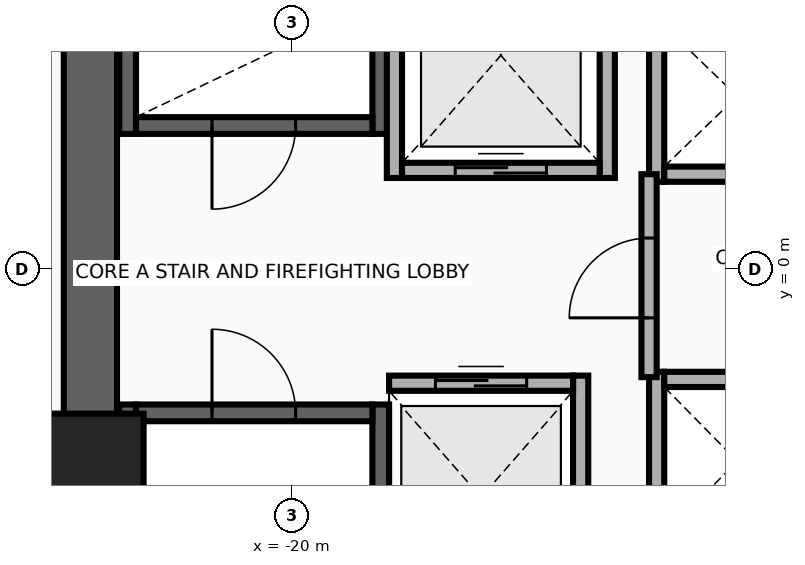
"""IFC4 building model, lengths in metres.
Left out: names, types, materials, properties, quantities, classifications, styles, units other than length and angle.
Written with IfcOpenShell. Run it as: python <this file> out.ifc"""

import sys

from ifc_helpers import new_model, si_unit, direction, frame, frame_2d, origin, origin_2d, place, context, subcontext, project, spatial, rectangle, extrude, source, transform, mapped, element, fill, save


model = new_model("IFC4")
c1 = context("Model", 3, precision=1e-05, world=origin(), true_north=direction((0.0, 1.0)))
c2 = subcontext(c1, "Body", "Model", "MODEL_VIEW")
j1 = project(units=[si_unit("LENGTHUNIT", "METRE"), si_unit("PLANEANGLEUNIT", "RADIAN")], contexts=[c1])
p1 = place(None, origin())
s1 = spatial("IfcSite", under=j1, at=p1, CompositionType="ELEMENT")
p2 = place(p1, origin())
s2 = spatial("IfcBuilding", under=s1, at=p2, CompositionType="ELEMENT")
p3 = place(p2, frame((0.0, 0.0, 37.1)))
s3 = spatial("IfcBuildingStorey", under=s2, at=p3, CompositionType="ELEMENT", Elevation=37.1)
for number, where, z_axis, x_axis in (
    (1, (-22.16, 1.78, 0.0), (0.0, 0.0, 1.0), (0.0, 1.0, 0.0)),
    (2, (-18.83, 1.78, 0.0), (0.0, 0.0, 1.0), (0.0, 1.0, 0.0)),
):
    element("IfcWall", number, at=place(p3, frame(where, z_axis=z_axis, x_axis=x_axis)), inside=s3, PredefinedType="SHEAR", context=c2, shape_type="SweptSolid", body=[
        extrude(rectangle(XDim=8.67, YDim=0.22, at=frame_2d((4.335, 0.0))), origin(), (0.0, 0.0, 1.0), 3.46),
    ])
p4 = place(p3, frame((-22.05, 1.89, 0.0), z_axis=(0.0, 0.0, 1.0), x_axis=(1.0, 0.0, 0.0)))
e3 = element("IfcWall", 3, at=p4, inside=s3, PredefinedType="SHEAR", context=c2, shape_type="SweptSolid", body=[
    extrude(rectangle(XDim=3.11, YDim=0.22, at=frame_2d((1.555, 0.0))), origin(), (0.0, 0.0, 1.0), 3.46),
])
p5 = place(p4, frame((1.0, 0.0, 0.0)))
e4 = element("IfcOpeningElement", 4, at=p5, cuts=e3, PredefinedType="OPENING", context=c2, shape_type="SweptSolid", body=[
    extrude(rectangle(XDim=1.1, YDim=2.15, at=frame_2d((0.55, 1.075))), frame((0.0, 0.125, 0.0), z_axis=(0.0, -1.0, 0.0), x_axis=(1.0, 0.0, 0.0)), (0.0, 0.0, 1.0), 0.25),
])
for number, where, z_axis, x_axis in (
    (5, (-22.16, -10.45, 0.0), (0.0, 0.0, 1.0), (0.0, 1.0, 0.0)),
    (6, (-18.83, -10.45, 0.0), (0.0, 0.0, 1.0), (0.0, 1.0, 0.0)),
):
    element("IfcWall", number, at=place(p3, frame(where, z_axis=z_axis, x_axis=x_axis)), inside=s3, PredefinedType="SHEAR", context=c2, shape_type="SweptSolid", body=[
        extrude(rectangle(XDim=8.67, YDim=0.22, at=frame_2d((4.335, 0.0))), origin(), (0.0, 0.0, 1.0), 3.46),
    ])
p6 = place(p3, frame((-22.05, -1.89, 0.0), z_axis=(0.0, 0.0, 1.0), x_axis=(1.0, 0.0, 0.0)))
e7 = element("IfcWall", 7, at=p6, inside=s3, PredefinedType="SHEAR", context=c2, shape_type="SweptSolid", body=[
    extrude(rectangle(XDim=3.11, YDim=0.22, at=frame_2d((1.555, 0.0))), origin(), (0.0, 0.0, 1.0), 3.46),
])
p7 = place(p6, frame((1.0, 0.0, 0.0)))
e8 = element("IfcOpeningElement", 8, at=p7, cuts=e7, PredefinedType="OPENING", context=c2, shape_type="SweptSolid", body=[
    extrude(rectangle(XDim=1.1, YDim=2.15, at=frame_2d((0.55, 1.075))), frame((0.0, 0.125, 0.0), z_axis=(0.0, -1.0, 0.0), x_axis=(1.0, 0.0, 0.0)), (0.0, 0.0, 1.0), 0.25),
])
p8 = place(p3, frame((-22.65, -11.15, 0.0), z_axis=(0.0, 0.0, 1.0), x_axis=(0.0, 1.0, 0.0)))
e9 = element("IfcWall", 9, at=p8, inside=s3, PredefinedType="SHEAR", context=c2, shape_type="SweptSolid", body=[
    extrude(rectangle(XDim=22.3, YDim=0.7, at=frame_2d((11.15, 0.0))), origin(), (0.0, 0.0, 1.0), 3.46),
])
m1 = source(origin(), c2, "Body", "SweptSolid", [
    extrude(rectangle(XDim=1.4, YDim=1.4, at=origin_2d()), origin(), (0.0, 0.0, 1.0), 3.7),
])
p9 = place(p3, frame((-22.65, -2.6, 0.0), z_axis=(0.0, 0.0, 1.0), x_axis=(1.0, 0.0, 0.0)))
e10 = element("IfcColumn", 10, at=p9, inside=s3, PredefinedType="COLUMN", context=c2, shape_type="MappedRepresentation", body=[
    mapped(m1, transform((0.0, 0.0, 0.0), x_axis=(1.0, 0.0, 0.0), y_axis=(0.0, 1.0, 0.0), z_axis=(0.0, 0.0, 1.0), scale=1.0)),
])
for number, where, z_axis, x_axis in (
    (11, (-18.65, 1.2, 0.0), (0.0, 0.0, 1.0), (0.0, 1.0, 0.0)),
    (12, (-15.85, 1.2, 0.0), (0.0, 0.0, 1.0), (0.0, 1.0, 0.0)),
):
    element("IfcWall", number, at=place(p3, frame(where, z_axis=z_axis, x_axis=x_axis)), inside=s3, PredefinedType="MOVABLE", context=c2, shape_type="SweptSolid", body=[
        extrude(rectangle(XDim=3.225, YDim=0.2, at=frame_2d((1.613, 0.0))), origin(), (0.0, 0.0, 1.0), 3.46),
    ])
p10 = place(p3, frame((-18.55, 1.3, 0.0), z_axis=(0.0, 0.0, 1.0), x_axis=(1.0, 0.0, 0.0)))
e13 = element("IfcWall", 13, at=p10, inside=s3, PredefinedType="MOVABLE", context=c2, shape_type="SweptSolid", body=[
    extrude(rectangle(XDim=2.6, YDim=0.2, at=frame_2d((1.3, 0.0))), origin(), (0.0, 0.0, 1.0), 3.46),
])
p11 = place(p10, frame((0.7, 0.0, 0.0)))
e14 = element("IfcOpeningElement", 14, at=p11, cuts=e13, PredefinedType="OPENING", context=c2, shape_type="SweptSolid", body=[
    extrude(rectangle(XDim=1.2, YDim=2.1, at=frame_2d((0.6, 1.05))), frame((0.0, 0.115, 0.0), z_axis=(0.0, -1.0, 0.0), x_axis=(1.0, 0.0, 0.0)), (0.0, 0.0, 1.0), 0.23),
])
p12 = place(p3, frame((-16.2, -4.6, 0.0), z_axis=(0.0, 0.0, 1.0), x_axis=(0.0, 1.0, 0.0)))
e15 = element("IfcWall", 15, at=p12, inside=s3, PredefinedType="MOVABLE", context=c2, shape_type="SweptSolid", body=[
    extrude(rectangle(XDim=3.2, YDim=0.2, at=frame_2d((1.6, 0.0))), origin(), (0.0, 0.0, 1.0), 3.46),
])
p13 = place(p3, frame((-18.72, -1.5, 0.0), z_axis=(0.0, 0.0, 1.0), x_axis=(1.0, 0.0, 0.0)))
e16 = element("IfcWall", 16, at=p13, inside=s3, PredefinedType="MOVABLE", context=c2, shape_type="SweptSolid", body=[
    extrude(rectangle(XDim=2.42, YDim=0.2, at=frame_2d((1.21, 0.0))), origin(), (0.0, 0.0, 1.0), 3.46),
])
p14 = place(p13, frame((0.61, 0.0, 0.0)))
e17 = element("IfcOpeningElement", 17, at=p14, cuts=e16, PredefinedType="OPENING", context=c2, shape_type="SweptSolid", body=[
    extrude(rectangle(XDim=1.2, YDim=2.1, at=frame_2d((0.6, 1.05))), frame((0.0, 0.115, 0.0), z_axis=(0.0, -1.0, 0.0), x_axis=(1.0, 0.0, 0.0)), (0.0, 0.0, 1.0), 0.23),
])
p15 = place(p3, frame((-15.2, 1.15, 0.0), z_axis=(0.0, 0.0, 1.0), x_axis=(0.0, 1.0, 0.0)))
e18 = element("IfcWall", 18, at=p15, inside=s3, PredefinedType="MOVABLE", context=c2, shape_type="SweptSolid", body=[
    extrude(rectangle(XDim=2.25, YDim=0.2, at=frame_2d((1.125, 0.0))), origin(), (0.0, 0.0, 1.0), 3.46),
])
p16 = place(p3, frame((-15.1, 1.25, 0.0), z_axis=(0.0, 0.0, 1.0), x_axis=(1.0, 0.0, 0.0)))
e19 = element("IfcWall", 19, at=p16, inside=s3, PredefinedType="MOVABLE", context=c2, shape_type="SweptSolid", body=[
    extrude(rectangle(XDim=1.92, YDim=0.2, at=frame_2d((0.96, 0.0))), origin(), (0.0, 0.0, 1.0), 3.46),
])
p17 = place(p3, frame((-15.2, -3.7, 0.0), z_axis=(0.0, 0.0, 1.0), x_axis=(0.0, 1.0, 0.0)))
e20 = element("IfcWall", 20, at=p17, inside=s3, PredefinedType="MOVABLE", context=c2, shape_type="SweptSolid", body=[
    extrude(rectangle(XDim=2.35, YDim=0.2, at=frame_2d((1.175, 0.0))), origin(), (0.0, 0.0, 1.0), 3.46),
])
p18 = place(p3, frame((-15.1, -1.45, 0.0), z_axis=(0.0, 0.0, 1.0), x_axis=(1.0, 0.0, 0.0)))
e21 = element("IfcWall", 21, at=p18, inside=s3, PredefinedType="MOVABLE", context=c2, shape_type="SweptSolid", body=[
    extrude(rectangle(XDim=1.92, YDim=0.2, at=frame_2d((0.96, 0.0))), origin(), (0.0, 0.0, 1.0), 3.46),
])
p19 = place(p3, frame((-15.3, -1.42, 0.0), z_axis=(0.0, 0.0, 1.0), x_axis=(0.0, 1.0, 0.0)))
e22 = element("IfcWall", 22, at=p19, inside=s3, PredefinedType="PARTITIONING", context=c2, shape_type="SweptSolid", body=[
    extrude(rectangle(XDim=2.67, YDim=0.2, at=frame_2d((1.335, 0.0))), origin(), (0.0, 0.0, 1.0), 3.46),
])
p20 = place(p19, frame((0.78, 0.0, 0.0)))
e23 = element("IfcOpeningElement", 23, at=p20, cuts=e22, PredefinedType="OPENING", context=c2, shape_type="SweptSolid", body=[
    extrude(rectangle(XDim=1.05, YDim=2.15, at=frame_2d((0.525, 1.075))), frame((0.0, 0.115, 0.0), z_axis=(0.0, -1.0, 0.0), x_axis=(1.0, 0.0, 0.0)), (0.0, 0.0, 1.0), 0.23),
])
p21 = place(p11, origin())
e24 = element("IfcDoor", 24, at=p21, inside=s3, OperationType="DOUBLE_DOOR_SLIDING", PredefinedType="DOOR", context=c2, shape_type="SweptSolid", body=[
    extrude(rectangle(XDim=1.2, YDim=2.1, at=frame_2d((0.6, 1.05))), frame((0.0, 0.025, 0.0), z_axis=(0.0, -1.0, 0.0), x_axis=(1.0, 0.0, 0.0)), (0.0, 0.0, 1.0), 0.05),
])
fill(e14, e24)
p22 = place(p14, origin())
e25 = element("IfcDoor", 25, at=p22, inside=s3, OperationType="DOUBLE_DOOR_SLIDING", PredefinedType="DOOR", context=c2, shape_type="SweptSolid", body=[
    extrude(rectangle(XDim=1.2, YDim=2.1, at=frame_2d((0.6, 1.05))), frame((0.0, 0.025, 0.0), z_axis=(0.0, -1.0, 0.0), x_axis=(1.0, 0.0, 0.0)), (0.0, 0.0, 1.0), 0.05),
])
fill(e17, e25)
p23 = place(p20, origin())
e26 = element("IfcDoor", 26, at=p23, inside=s3, OperationType="SINGLE_SWING_RIGHT", PredefinedType="DOOR", context=c2, shape_type="SweptSolid", body=[
    extrude(rectangle(XDim=1.05, YDim=2.15, at=frame_2d((0.525, 1.075))), frame((0.0, 0.025, 0.0), z_axis=(0.0, -1.0, 0.0), x_axis=(1.0, 0.0, 0.0)), (0.0, 0.0, 1.0), 0.05),
])
fill(e23, e26)
p24 = place(p5, frame((1.1, 0.0, 0.0), z_axis=(0.0, 0.0, 1.0), x_axis=(-1.0, 0.0, 0.0)))
e27 = element("IfcDoor", 27, at=p24, inside=s3, OperationType="SINGLE_SWING_LEFT", PredefinedType="DOOR", context=c2, shape_type="SweptSolid", body=[
    extrude(rectangle(XDim=1.1, YDim=2.15, at=frame_2d((0.55, 1.075))), frame((0.0, 0.025, 0.0), z_axis=(0.0, -1.0, 0.0), x_axis=(1.0, 0.0, 0.0)), (0.0, 0.0, 1.0), 0.05),
])
fill(e4, e27)
p25 = place(p7, origin())
e28 = element("IfcDoor", 28, at=p25, inside=s3, OperationType="SINGLE_SWING_RIGHT", PredefinedType="DOOR", context=c2, shape_type="SweptSolid", body=[
    extrude(rectangle(XDim=1.1, YDim=2.15, at=frame_2d((0.55, 1.075))), frame((0.0, 0.025, 0.0), z_axis=(0.0, -1.0, 0.0), x_axis=(1.0, 0.0, 0.0)), (0.0, 0.0, 1.0), 0.05),
])
fill(e8, e28)
save(model, sys.argv[1])
